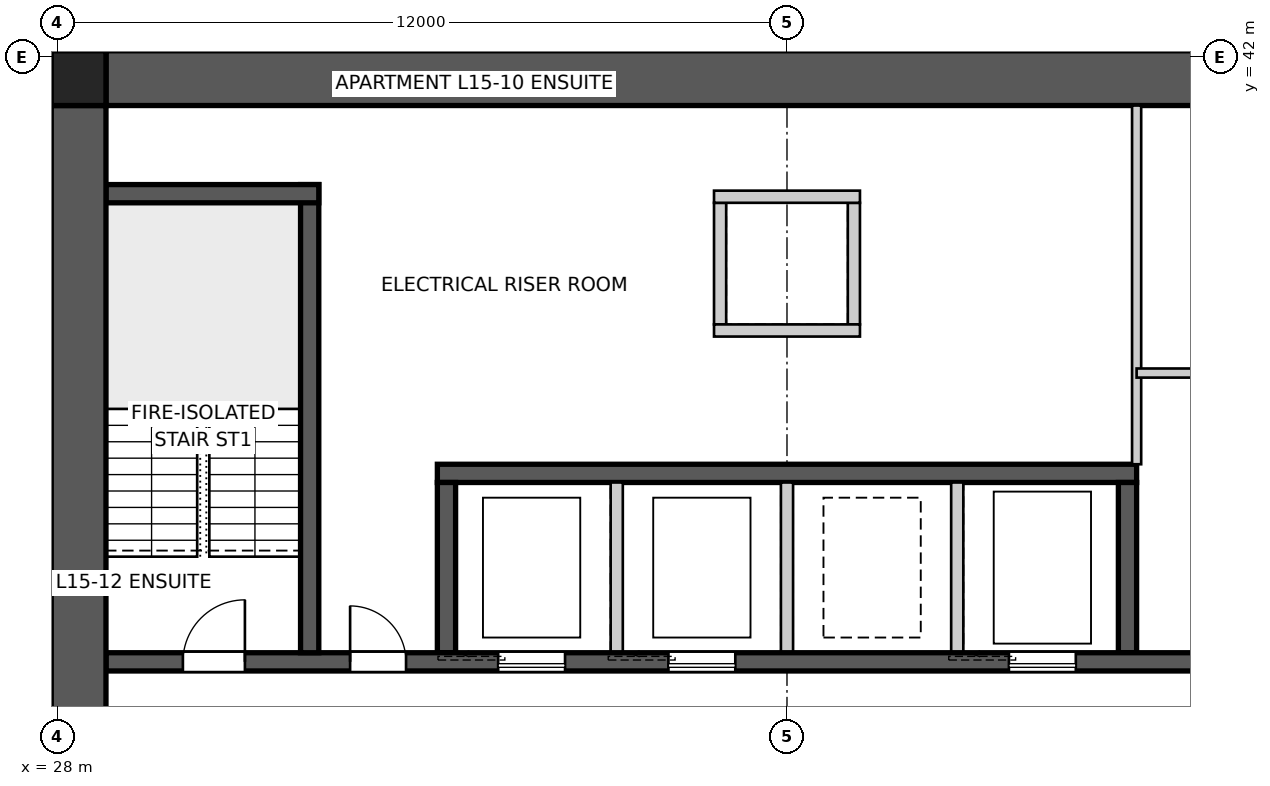
"""IFC4 building model, lengths in metres.
Left out: names, types, materials, properties, quantities, classifications, styles, units other than length and angle.
Written with IfcOpenShell. Run it as: python <this file> out.ifc"""

import sys

from ifc_helpers import new_model, si_unit, direction, frame, frame_2d, origin, origin_2d, place, context, subcontext, project, spatial, polyline, rectangle, outline, extrude, element, fill, save


model = new_model("IFC4")
c1 = context("Model", 3, precision=1e-05, world=origin(), true_north=direction((0.0, 1.0)))
c2 = subcontext(c1, "Body", "Model", "MODEL_VIEW")
j1 = project(units=[si_unit("LENGTHUNIT", "METRE"), si_unit("PLANEANGLEUNIT", "RADIAN")], contexts=[c1])
p1 = place(None, origin())
s1 = spatial("IfcSite", under=j1, at=p1, CompositionType="ELEMENT")
p2 = place(p1, origin())
s2 = spatial("IfcBuilding", under=s1, at=p2, CompositionType="ELEMENT")
p3 = place(p2, frame((0.0, 0.0, 57.4)))
s3 = spatial("IfcBuildingStorey", under=s2, at=p3, CompositionType="ELEMENT", Elevation=57.4)
p4 = place(p3, frame((28.8, 41.65, 0.0), z_axis=(0.0, 0.0, 1.0), x_axis=(1.0, 0.0, 0.0)))
e1 = element("IfcWall", 1, at=p4, inside=s3, PredefinedType="SHEAR", context=c2, shape_type="SweptSolid", body=[
    extrude(outline(polyline([(0.0, -0.45), (22.4, -0.45), (22.4, -0.025), (22.85, -0.025), (22.85, 0.025), (22.4, 0.025), (22.4, 0.45), (0.0, 0.45), (0.0, 0.025), (-0.45, 0.025), (-0.45, -0.025), (0.0, -0.025), (0.0, -0.45)])), origin(), (0.0, 0.0, 1.0), 3.4),
])
p5 = place(p3, frame((28.35, 41.2, 0.0), z_axis=(0.0, 0.0, 1.0), x_axis=(0.0, -1.0, 0.0)))
e2 = element("IfcWall", 2, at=p5, inside=s3, PredefinedType="SHEAR", context=c2, shape_type="SweptSolid", body=[
    extrude(outline(polyline([(0.0, -0.45), (22.4, -0.45), (22.4, -0.025), (22.85, -0.025), (22.85, 0.025), (22.4, 0.025), (22.4, 0.45), (0.0, 0.45), (0.0, 0.025), (-0.45, 0.025), (-0.45, -0.025), (0.0, -0.025), (0.0, -0.45)])), origin(), (0.0, 0.0, 1.0), 3.4),
])
p6 = place(p5, frame((11.14, 0.0, 0.0)))
e3 = element("IfcOpeningElement", 3, at=p6, cuts=e2, PredefinedType="OPENING", context=c2, shape_type="SweptSolid", body=[
    extrude(rectangle(XDim=1.02, YDim=2.4, at=frame_2d((0.51, 1.2))), frame((0.0, 0.46, 0.0), z_axis=(0.0, -1.0, 0.0), x_axis=(1.0, 0.0, 0.0)), (0.0, 0.0, 1.0), 0.92),
])
p7 = place(p3, frame((28.8, 32.05, 0.0), z_axis=(0.0, 0.0, 1.0), x_axis=(1.0, 0.0, 0.0)))
e4 = element("IfcWall", 4, at=p7, inside=s3, PredefinedType="SHEAR", context=c2, shape_type="SweptSolid", body=[
    extrude(rectangle(XDim=22.4, YDim=0.3, at=frame_2d((11.2, 0.0))), origin(), (0.0, 0.0, 1.0), 3.4),
])
p8 = place(p7, frame((19.04, 0.0, 0.0)))
e5 = element("IfcOpeningElement", 5, at=p8, cuts=e4, PredefinedType="OPENING", context=c2, shape_type="SweptSolid", body=[
    extrude(rectangle(XDim=0.92, YDim=2.1, at=frame_2d((0.46, 1.05))), frame((0.0, 0.16, 0.0), z_axis=(0.0, -1.0, 0.0), x_axis=(1.0, 0.0, 0.0)), (0.0, 0.0, 1.0), 0.32),
])
p9 = place(p7, frame((1.265, 0.0, 0.0)))
e6 = element("IfcOpeningElement", 6, at=p9, cuts=e4, PredefinedType="OPENING", context=c2, shape_type="SweptSolid", body=[
    extrude(rectangle(XDim=1.02, YDim=2.1, at=frame_2d((0.51, 1.05))), frame((0.0, 0.16, 0.0), z_axis=(0.0, -1.0, 0.0), x_axis=(1.0, 0.0, 0.0)), (0.0, 0.0, 1.0), 0.32),
])
p10 = place(p7, frame((4.015, 0.0, 0.0)))
e7 = element("IfcOpeningElement", 7, at=p10, cuts=e4, PredefinedType="OPENING", context=c2, shape_type="SweptSolid", body=[
    extrude(rectangle(XDim=0.92, YDim=2.1, at=frame_2d((0.46, 1.05))), frame((0.0, 0.16, 0.0), z_axis=(0.0, -1.0, 0.0), x_axis=(1.0, 0.0, 0.0)), (0.0, 0.0, 1.0), 0.32),
])
p11 = place(p7, frame((6.45, 0.0, 0.0)))
e8 = element("IfcOpeningElement", 8, at=p11, cuts=e4, PredefinedType="OPENING", context=c2, shape_type="SweptSolid", body=[
    extrude(rectangle(XDim=1.1, YDim=2.1, at=frame_2d((0.55, 1.05))), frame((0.0, 0.16, 0.0), z_axis=(0.0, -1.0, 0.0), x_axis=(1.0, 0.0, 0.0)), (0.0, 0.0, 1.0), 0.32),
])
p12 = place(p7, frame((9.25, 0.0, 0.0)))
e9 = element("IfcOpeningElement", 9, at=p12, cuts=e4, PredefinedType="OPENING", context=c2, shape_type="SweptSolid", body=[
    extrude(rectangle(XDim=1.1, YDim=2.1, at=frame_2d((0.55, 1.05))), frame((0.0, 0.16, 0.0), z_axis=(0.0, -1.0, 0.0), x_axis=(1.0, 0.0, 0.0)), (0.0, 0.0, 1.0), 0.32),
])
p13 = place(p7, frame((14.85, 0.0, 0.0)))
e10 = element("IfcOpeningElement", 10, at=p13, cuts=e4, PredefinedType="OPENING", context=c2, shape_type="SweptSolid", body=[
    extrude(rectangle(XDim=1.1, YDim=2.1, at=frame_2d((0.55, 1.05))), frame((0.0, 0.16, 0.0), z_axis=(0.0, -1.0, 0.0), x_axis=(1.0, 0.0, 0.0)), (0.0, 0.0, 1.0), 0.32),
])
p14 = place(p3, frame((34.25, 35.15, 0.0), z_axis=(0.0, 0.0, 1.0), x_axis=(1.0, 0.0, 0.0)))
e11 = element("IfcWall", 11, at=p14, inside=s3, PredefinedType="SHEAR", context=c2, shape_type="SweptSolid", body=[
    extrude(rectangle(XDim=11.5, YDim=0.3, at=frame_2d((5.75, 0.0))), origin(), (0.0, 0.0, 1.0), 3.4),
])
p15 = place(p3, frame((34.4, 32.2, 0.0), z_axis=(0.0, 0.0, 1.0), x_axis=(0.0, 1.0, 0.0)))
e12 = element("IfcWall", 12, at=p15, inside=s3, PredefinedType="SHEAR", context=c2, shape_type="SweptSolid", body=[
    extrude(rectangle(XDim=2.8, YDim=0.3, at=frame_2d((1.4, 0.0))), origin(), (0.0, 0.0, 1.0), 3.4),
])
for number, where, z_axis, x_axis in (
    (13, (37.2, 32.2, 0.0), (0.0, 0.0, 1.0), (0.0, 1.0, 0.0)),
    (14, (40.0, 32.2, 0.0), (0.0, 0.0, 1.0), (0.0, 1.0, 0.0)),
    (15, (42.8, 32.2, 0.0), (0.0, 0.0, 1.0), (0.0, 1.0, 0.0)),
):
    element("IfcWall", number, at=place(p3, frame(where, z_axis=z_axis, x_axis=x_axis)), inside=s3, PredefinedType="SOLIDWALL", context=c2, shape_type="SweptSolid", body=[
        extrude(rectangle(XDim=2.8, YDim=0.2, at=frame_2d((1.4, 0.0))), origin(), (0.0, 0.0, 1.0), 3.4),
    ])
p16 = place(p3, frame((45.6, 32.2, 0.0), z_axis=(0.0, 0.0, 1.0), x_axis=(0.0, 1.0, 0.0)))
e16 = element("IfcWall", 16, at=p16, inside=s3, PredefinedType="SHEAR", context=c2, shape_type="SweptSolid", body=[
    extrude(rectangle(XDim=2.8, YDim=0.3, at=frame_2d((1.4, 0.0))), origin(), (0.0, 0.0, 1.0), 3.4),
])
p17 = place(p3, frame((32.15, 32.2, 0.0), z_axis=(0.0, 0.0, 1.0), x_axis=(0.0, 1.0, 0.0)))
e17 = element("IfcWall", 17, at=p17, inside=s3, PredefinedType="SHEAR", context=c2, shape_type="SweptSolid", body=[
    extrude(rectangle(XDim=7.7, YDim=0.3, at=frame_2d((3.85, 0.0))), origin(), (0.0, 0.0, 1.0), 3.4),
])
p18 = place(p3, frame((28.8, 39.75, 0.0), z_axis=(0.0, 0.0, 1.0), x_axis=(1.0, 0.0, 0.0)))
e18 = element("IfcWall", 18, at=p18, inside=s3, PredefinedType="SHEAR", context=c2, shape_type="SweptSolid", body=[
    extrude(rectangle(XDim=3.5, YDim=0.3, at=frame_2d((1.75, 0.0))), origin(), (0.0, 0.0, 1.0), 3.4),
])
for number, where, z_axis, x_axis in (
    (19, (38.9, 37.6, 0.0), (0.0, 0.0, 1.0), (0.0, 1.0, 0.0)),
    (20, (41.1, 37.6, 0.0), (0.0, 0.0, 1.0), (0.0, 1.0, 0.0)),
):
    element("IfcWall", number, at=place(p3, frame(where, z_axis=z_axis, x_axis=x_axis)), inside=s3, PredefinedType="SOLIDWALL", context=c2, shape_type="SweptSolid", body=[
        extrude(rectangle(XDim=2.0, YDim=0.2, at=frame_2d((1.0, 0.0))), origin(), (0.0, 0.0, 1.0), 3.4),
    ])
for number, where, z_axis, x_axis in (
    (21, (38.8, 37.5, 0.0), (0.0, 0.0, 1.0), (1.0, 0.0, 0.0)),
    (22, (38.8, 39.7, 0.0), (0.0, 0.0, 1.0), (1.0, 0.0, 0.0)),
):
    element("IfcWall", number, at=place(p3, frame(where, z_axis=z_axis, x_axis=x_axis)), inside=s3, PredefinedType="SOLIDWALL", context=c2, shape_type="SweptSolid", body=[
        extrude(rectangle(XDim=2.4, YDim=0.2, at=frame_2d((1.2, 0.0))), origin(), (0.0, 0.0, 1.0), 3.4),
    ])
p19 = place(p3, frame((28.35, 41.65, 0.0), z_axis=(0.0, 0.0, 1.0), x_axis=(1.0, 0.0, 0.0)))
e23 = element("IfcColumn", 23, at=p19, inside=s3, PredefinedType="COLUMN", context=c2, shape_type="SweptSolid", body=[
    extrude(rectangle(XDim=0.9, YDim=0.9, at=origin_2d()), origin(), (0.0, 0.0, 1.0), 3.4),
])
p20 = place(p3, frame((45.75, 41.2, 0.0), z_axis=(0.0, 0.0, 1.0), x_axis=(0.0, -1.0, 0.0)))
e24 = element("IfcWall", 24, at=p20, inside=s3, PredefinedType="SOLIDWALL", context=c2, shape_type="SweptSolid", body=[
    extrude(rectangle(XDim=5.9, YDim=0.15, at=frame_2d((2.95, 0.0))), origin(), (0.0, 0.0, 1.0), 3.25),
])
p21 = place(p3, frame((45.75, 36.8, 0.0), z_axis=(0.0, 0.0, 1.0), x_axis=(1.0, 0.0, 0.0)))
e25 = element("IfcWall", 25, at=p21, inside=s3, PredefinedType="SOLIDWALL", context=c2, shape_type="SweptSolid", body=[
    extrude(rectangle(XDim=5.45, YDim=0.15, at=frame_2d((2.725, 0.0))), origin(), (0.0, 0.0, 1.0), 3.25),
])
p22 = place(p21, frame((2.265, 0.0, 0.0)))
e26 = element("IfcOpeningElement", 26, at=p22, cuts=e25, PredefinedType="OPENING", context=c2, shape_type="SweptSolid", body=[
    extrude(rectangle(XDim=0.92, YDim=2.1, at=frame_2d((0.46, 1.05))), frame((0.0, 0.085, 0.0), z_axis=(0.0, -1.0, 0.0), x_axis=(1.0, 0.0, 0.0)), (0.0, 0.0, 1.0), 0.17),
])
p23 = place(p9, origin())
e27 = element("IfcDoor", 27, at=p23, inside=s3, OperationType="SINGLE_SWING_RIGHT", PredefinedType="DOOR", context=c2, shape_type="SweptSolid", body=[
    extrude(rectangle(XDim=1.02, YDim=2.1, at=frame_2d((0.51, 1.05))), frame((0.0, 0.025, 0.0), z_axis=(0.0, -1.0, 0.0), x_axis=(1.0, 0.0, 0.0)), (0.0, 0.0, 1.0), 0.05),
])
fill(e6, e27)
p24 = place(p10, origin())
e28 = element("IfcDoor", 28, at=p24, inside=s3, OperationType="SINGLE_SWING_LEFT", PredefinedType="DOOR", context=c2, shape_type="SweptSolid", body=[
    extrude(rectangle(XDim=0.92, YDim=2.1, at=frame_2d((0.46, 1.05))), frame((0.0, 0.025, 0.0), z_axis=(0.0, -1.0, 0.0), x_axis=(1.0, 0.0, 0.0)), (0.0, 0.0, 1.0), 0.05),
])
fill(e7, e28)
p25 = place(p11, origin())
e29 = element("IfcDoor", 29, at=p25, inside=s3, OperationType="SLIDING_TO_LEFT", PredefinedType="DOOR", context=c2, shape_type="SweptSolid", body=[
    extrude(rectangle(XDim=1.1, YDim=2.1, at=frame_2d((0.55, 1.05))), frame((0.0, 0.025, 0.0), z_axis=(0.0, -1.0, 0.0), x_axis=(1.0, 0.0, 0.0)), (0.0, 0.0, 1.0), 0.05),
])
fill(e8, e29)
p26 = place(p12, origin())
e30 = element("IfcDoor", 30, at=p26, inside=s3, OperationType="SLIDING_TO_LEFT", PredefinedType="DOOR", context=c2, shape_type="SweptSolid", body=[
    extrude(rectangle(XDim=1.1, YDim=2.1, at=frame_2d((0.55, 1.05))), frame((0.0, 0.025, 0.0), z_axis=(0.0, -1.0, 0.0), x_axis=(1.0, 0.0, 0.0)), (0.0, 0.0, 1.0), 0.05),
])
fill(e9, e30)
p27 = place(p13, origin())
e31 = element("IfcDoor", 31, at=p27, inside=s3, OperationType="SLIDING_TO_LEFT", PredefinedType="DOOR", context=c2, shape_type="SweptSolid", body=[
    extrude(rectangle(XDim=1.1, YDim=2.1, at=frame_2d((0.55, 1.05))), frame((0.0, 0.025, 0.0), z_axis=(0.0, -1.0, 0.0), x_axis=(1.0, 0.0, 0.0)), (0.0, 0.0, 1.0), 0.05),
])
fill(e10, e31)
save(model, sys.argv[1])
